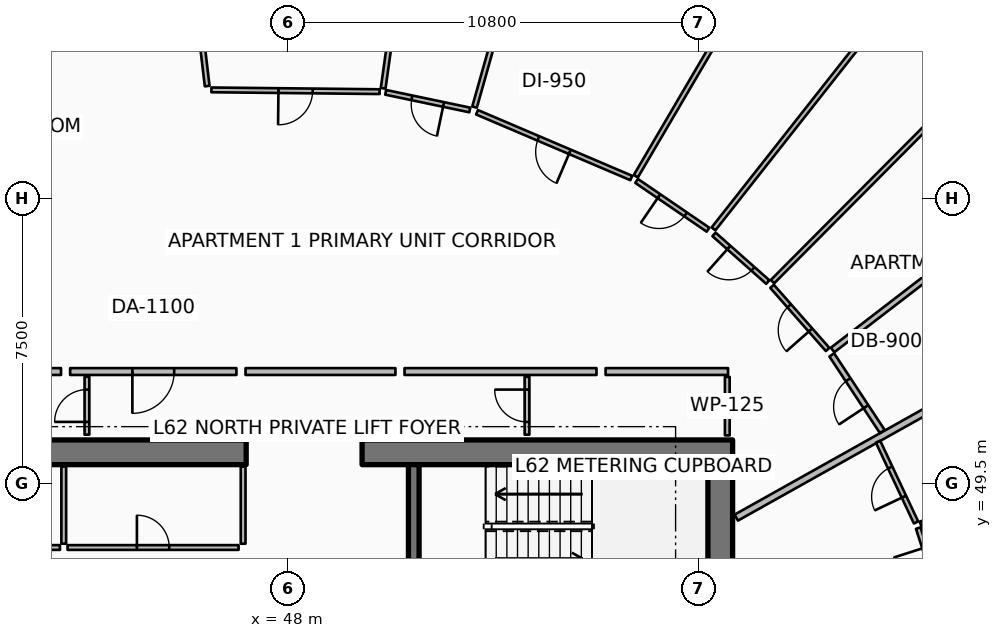
"""IFC4 building model, lengths in metres.
Left out: names, types, materials, properties, quantities, classifications, styles, units other than length and angle.
Written with IfcOpenShell. Run it as: python <this file> out.ifc"""

import sys

from ifc_helpers import new_model, si_unit, direction, frame, frame_2d, origin, place, context, subcontext, project, spatial, rectangle, extrude, element, fill, save


model = new_model("IFC4")
c1 = context("Model", 3, precision=1e-05, world=origin(), true_north=direction((0.0, 1.0)))
c2 = subcontext(c1, "Body", "Model", "MODEL_VIEW")
j1 = project(units=[si_unit("LENGTHUNIT", "METRE"), si_unit("PLANEANGLEUNIT", "RADIAN")], contexts=[c1])
p1 = place(None, origin())
s1 = spatial("IfcSite", under=j1, at=p1, CompositionType="ELEMENT")
p2 = place(p1, origin())
s2 = spatial("IfcBuilding", under=s1, at=p2, CompositionType="ELEMENT")
p3 = place(p2, frame((0.0, 0.0, 248.25)))
s3 = spatial("IfcBuildingStorey", under=s2, at=p3, CompositionType="ELEMENT", Elevation=248.25)
for number, where, z_axis, x_axis in (
    (1, (37.15, 50.325, 0.0), (0.0, 0.0, 1.0), (1.0, 0.0, 0.0)),
    (2, (49.95, 50.325, 0.0), (0.0, 0.0, 1.0), (1.0, 0.0, 0.0)),
):
    element("IfcWall", number, at=place(p3, frame(where, z_axis=z_axis, x_axis=x_axis)), inside=s3, PredefinedType="SHEAR", context=c2, shape_type="SweptSolid", body=[
        extrude(rectangle(XDim=9.75, YDim=0.65, at=frame_2d((4.875, 0.0))), origin(), (0.0, 0.0, 1.0), 3.85),
    ])
p4 = place(p3, frame((59.375, 34.0, 0.0), z_axis=(0.0, 0.0, 1.0), x_axis=(0.0, 1.0, 0.0)))
e3 = element("IfcWall", 3, at=p4, inside=s3, PredefinedType="SHEAR", context=c2, shape_type="SweptSolid", body=[
    extrude(rectangle(XDim=16.0, YDim=0.65, at=frame_2d((8.0, 0.0))), origin(), (0.0, 0.0, 1.0), 3.85),
])
p5 = place(p3, frame((51.31, 46.5, 0.0), z_axis=(0.0, 0.0, 1.0), x_axis=(0.0, 1.0, 0.0)))
e4 = element("IfcWall", 4, at=p5, inside=s3, PredefinedType="SHEAR", context=c2, shape_type="SweptSolid", body=[
    extrude(rectangle(XDim=3.5, YDim=0.28, at=frame_2d((1.75, 0.0))), origin(), (0.0, 0.0, 1.0), 3.85),
])
for number, where, z_axis, x_axis in (
    (5, (46.82, 47.92, 0.0), (0.0, 0.0, 1.0), (0.0, 1.0, 0.0)),
    (6, (42.1, 47.92, 0.0), (0.0, 0.0, 1.0), (0.0, 1.0, 0.0)),
):
    element("IfcWall", number, at=place(p3, frame(where, z_axis=z_axis, x_axis=x_axis)), inside=s3, PredefinedType="PARTITIONING", context=c2, shape_type="SweptSolid", body=[
        extrude(rectangle(XDim=2.03, YDim=0.125, at=frame_2d((1.015, 0.0))), origin(), (0.0, 0.0, 1.0), 3.03),
    ])
p6 = place(p3, frame((37.92, 47.82, 0.0), z_axis=(0.0, 0.0, 1.0), x_axis=(1.0, 0.0, 0.0)))
e7 = element("IfcWall", 7, at=p6, inside=s3, PredefinedType="PARTITIONING", context=c2, shape_type="SweptSolid", body=[
    extrude(rectangle(XDim=4.08, YDim=0.125, at=frame_2d((2.04, 0.0))), origin(), (0.0, 0.0, 1.0), 3.03),
])
p7 = place(p6, frame((1.615, 0.0, 0.0)))
e8 = element("IfcOpeningElement", 8, at=p7, cuts=e7, PredefinedType="OPENING", context=c2, shape_type="SweptSolid", body=[
    extrude(rectangle(XDim=0.85, YDim=2.06, at=frame_2d((0.425, 1.03))), frame((0.0, 0.073, 0.0), z_axis=(0.0, -1.0, 0.0), x_axis=(1.0, 0.0, 0.0)), (0.0, 0.0, 1.0), 0.145),
])
p8 = place(p3, frame((42.2, 47.82, 0.0), z_axis=(0.0, 0.0, 1.0), x_axis=(1.0, 0.0, 0.0)))
e9 = element("IfcWall", 9, at=p8, inside=s3, PredefinedType="PARTITIONING", context=c2, shape_type="SweptSolid", body=[
    extrude(rectangle(XDim=4.5, YDim=0.125, at=frame_2d((2.25, 0.0))), origin(), (0.0, 0.0, 1.0), 3.03),
])
p9 = place(p8, frame((1.825, 0.0, 0.0)))
e10 = element("IfcOpeningElement", 10, at=p9, cuts=e9, PredefinedType="OPENING", context=c2, shape_type="SweptSolid", body=[
    extrude(rectangle(XDim=0.85, YDim=2.06, at=frame_2d((0.425, 1.03))), frame((0.0, 0.073, 0.0), z_axis=(0.0, -1.0, 0.0), x_axis=(1.0, 0.0, 0.0)), (0.0, 0.0, 1.0), 0.145),
])
p10 = place(p3, frame((59.56, 50.77, 0.0), z_axis=(0.0, 0.0, 1.0), x_axis=(0.0, 1.0, 0.0)))
e11 = element("IfcWall", 11, at=p10, inside=s3, PredefinedType="PARTITIONING", context=c2, shape_type="SweptSolid", body=[
    extrude(rectangle(XDim=1.54, YDim=0.125, at=frame_2d((0.77, 0.0))), origin(), (0.0, 0.0, 1.0), 3.03),
])
p11 = place(p3, frame((42.71, 50.79, 0.0), z_axis=(0.0, 0.0, 1.0), x_axis=(0.0, 1.0, 0.0)))
e12 = element("IfcWall", 12, at=p11, inside=s3, PredefinedType="PARTITIONING", context=c2, shape_type="SweptSolid", body=[
    extrude(rectangle(XDim=1.52, YDim=0.125, at=frame_2d((0.76, 0.0))), origin(), (0.0, 0.0, 1.0), 2.957),
])
p12 = place(p11, frame((0.335, 0.0, 0.0)))
e13 = element("IfcOpeningElement", 13, at=p12, cuts=e12, PredefinedType="OPENING", context=c2, shape_type="SweptSolid", body=[
    extrude(rectangle(XDim=0.85, YDim=2.06, at=frame_2d((0.425, 1.03))), frame((0.0, 0.073, 0.0), z_axis=(0.0, -1.0, 0.0), x_axis=(1.0, 0.0, 0.0)), (0.0, 0.0, 1.0), 0.145),
])
p13 = place(p3, frame((54.29, 50.79, 0.0), z_axis=(0.0, 0.0, 1.0), x_axis=(0.0, 1.0, 0.0)))
e14 = element("IfcWall", 14, at=p13, inside=s3, PredefinedType="PARTITIONING", context=c2, shape_type="SweptSolid", body=[
    extrude(rectangle(XDim=1.52, YDim=0.125, at=frame_2d((0.76, 0.0))), origin(), (0.0, 0.0, 1.0), 3.03),
])
p14 = place(p13, frame((0.335, 0.0, 0.0)))
e15 = element("IfcOpeningElement", 15, at=p14, cuts=e14, PredefinedType="OPENING", context=c2, shape_type="SweptSolid", body=[
    extrude(rectangle(XDim=0.85, YDim=2.06, at=frame_2d((0.425, 1.03))), frame((0.0, 0.073, 0.0), z_axis=(0.0, -1.0, 0.0), x_axis=(1.0, 0.0, 0.0)), (0.0, 0.0, 1.0), 0.145),
])
p15 = place(p3, frame((59.796, 48.606, 0.0), z_axis=(0.0, 0.0, 1.0), x_axis=(0.872493213488, 0.488626229767, 0.0)))
e16 = element("IfcWall", 16, at=p15, inside=s3, PredefinedType="PARTITIONING", context=c2, shape_type="SweptSolid", body=[
    extrude(rectangle(XDim=16.91, YDim=0.18, at=frame_2d((8.455, 0.0))), origin(), (0.0, 0.0, 1.0), 2.957),
])
p16 = place(p3, frame((46.643, 52.45, 0.0), z_axis=(0.0, 0.0, 1.0), x_axis=(-1.0, 0.0, 0.0)))
e17 = element("IfcWall", 17, at=p16, inside=s3, PredefinedType="PARTITIONING", context=c2, shape_type="SweptSolid", body=[
    extrude(rectangle(XDim=4.376, YDim=0.18, at=frame_2d((2.188, 0.0))), origin(), (0.0, 0.0, 1.0), 2.957),
])
p17 = place(p16, frame((1.638, 0.0, 0.0)))
e18 = element("IfcOpeningElement", 18, at=p17, cuts=e17, PredefinedType="OPENING", context=c2, shape_type="SweptSolid", body=[
    extrude(rectangle(XDim=1.1, YDim=2.1, at=frame_2d((0.55, 1.05))), frame((0.0, 0.1, 0.0), z_axis=(0.0, -1.0, 0.0), x_axis=(1.0, 0.0, 0.0)), (0.0, 0.0, 1.0), 0.2),
])
p18 = place(p3, frame((59.58, 52.45, 0.0), z_axis=(0.0, 0.0, 1.0), x_axis=(-1.0, 0.0, 0.0)))
e19 = element("IfcWall", 19, at=p18, inside=s3, PredefinedType="PARTITIONING", context=c2, shape_type="SweptSolid", body=[
    extrude(rectangle(XDim=3.222, YDim=0.18, at=frame_2d((1.611, 0.0))), origin(), (0.0, 0.0, 1.0), 2.957),
])
p19 = place(p3, frame((63.639, 50.872, 0.0), z_axis=(0.0, 0.0, 1.0), x_axis=(-0.550539267926, 0.834809268319, 0.0)))
e20 = element("IfcWall", 20, at=p19, inside=s3, PredefinedType="PARTITIONING", context=c2, shape_type="SweptSolid", body=[
    extrude(rectangle(XDim=2.414, YDim=0.15, at=frame_2d((1.207, 0.0))), origin(), (0.0, 0.0, 1.0), 2.957),
])
p20 = place(p19, frame((0.782, 0.0, 0.0)))
e21 = element("IfcOpeningElement", 21, at=p20, cuts=e20, PredefinedType="OPENING", context=c2, shape_type="SweptSolid", body=[
    extrude(rectangle(XDim=0.85, YDim=2.06, at=frame_2d((0.425, 1.03))), frame((0.0, 0.085, 0.0), z_axis=(0.0, -1.0, 0.0), x_axis=(1.0, 0.0, 0.0)), (0.0, 0.0, 1.0), 0.17),
])
p21 = place(p3, frame((62.331, 53.018, 0.0), z_axis=(0.0, 0.0, 1.0), x_axis=(0.792803030826, 0.609477935871, 0.0)))
e22 = element("IfcWall", 22, at=p21, inside=s3, PredefinedType="PARTITIONING", context=c2, shape_type="SweptSolid", body=[
    extrude(rectangle(XDim=4.46, YDim=0.15, at=frame_2d((2.23, 0.0))), origin(), (0.0, 0.0, 1.0), 3.03),
])
p22 = place(p3, frame((60.749, 54.815, 0.0), z_axis=(0.0, 0.0, 1.0), x_axis=(0.705267705861, 0.708941085753, 0.0)))
e23 = element("IfcWall", 23, at=p22, inside=s3, PredefinedType="PARTITIONING", context=c2, shape_type="SweptSolid", body=[
    extrude(rectangle(XDim=11.498, YDim=0.125, at=frame_2d((5.749, 0.0))), origin(), (0.0, 0.0, 1.0), 3.03),
])
p23 = place(p3, frame((62.2, 53.031, 0.0), z_axis=(0.0, 0.0, 1.0), x_axis=(-0.660650282497, 0.750693815238, 0.0)))
e24 = element("IfcWall", 24, at=p23, inside=s3, PredefinedType="PARTITIONING", context=c2, shape_type="SweptSolid", body=[
    extrude(rectangle(XDim=2.212, YDim=0.125, at=frame_2d((1.106, 0.0))), origin(), (0.0, 0.0, 1.0), 3.03),
])
p24 = place(p23, frame((0.681, 0.0, 0.0)))
e25 = element("IfcOpeningElement", 25, at=p24, cuts=e24, PredefinedType="OPENING", context=c2, shape_type="SweptSolid", body=[
    extrude(rectangle(XDim=0.85, YDim=2.06, at=frame_2d((0.425, 1.03))), frame((0.0, 0.073, 0.0), z_axis=(0.0, -1.0, 0.0), x_axis=(1.0, 0.0, 0.0)), (0.0, 0.0, 1.0), 0.145),
])
p25 = place(p3, frame((60.626, 54.805, 0.0), z_axis=(0.0, 0.0, 1.0), x_axis=(-0.748419746602, 0.663225363581, 0.0)))
e26 = element("IfcWall", 26, at=p25, inside=s3, PredefinedType="PARTITIONING", context=c2, shape_type="SweptSolid", body=[
    extrude(rectangle(XDim=1.891, YDim=0.125, at=frame_2d((0.946, 0.0))), origin(), (0.0, 0.0, 1.0), 2.957),
])
p26 = place(p25, frame((0.521, 0.0, 0.0)))
e27 = element("IfcOpeningElement", 27, at=p26, cuts=e26, PredefinedType="OPENING", context=c2, shape_type="SweptSolid", body=[
    extrude(rectangle(XDim=0.85, YDim=2.06, at=frame_2d((0.425, 1.03))), frame((0.0, 0.073, 0.0), z_axis=(0.0, -1.0, 0.0), x_axis=(1.0, 0.0, 0.0)), (0.0, 0.0, 1.0), 0.145),
])
p27 = place(p3, frame((56.118, 52.45, 0.0), z_axis=(0.0, 0.0, 1.0), x_axis=(-1.0, 0.0, 0.0)))
e28 = element("IfcWall", 28, at=p27, inside=s3, PredefinedType="PARTITIONING", context=c2, shape_type="SweptSolid", body=[
    extrude(rectangle(XDim=5.051, YDim=0.18, at=frame_2d((2.525, 0.0))), origin(), (0.0, 0.0, 1.0), 2.957),
])
p28 = place(p3, frame((59.198, 56.204, 0.0), z_axis=(0.0, 0.0, 1.0), x_axis=(0.619101452742, 0.785311015593, 0.0)))
e29 = element("IfcWall", 29, at=p28, inside=s3, PredefinedType="PARTITIONING", context=c2, shape_type="SweptSolid", body=[
    extrude(rectangle(XDim=11.509, YDim=0.125, at=frame_2d((5.754, 0.0))), origin(), (0.0, 0.0, 1.0), 2.957),
])
p29 = place(p3, frame((57.153, 57.588, 0.0), z_axis=(0.0, 0.0, 1.0), x_axis=(0.506323477253, 0.862343630105, 0.0)))
e30 = element("IfcWall", 30, at=p29, inside=s3, PredefinedType="PARTITIONING", context=c2, shape_type="SweptSolid", body=[
    extrude(rectangle(XDim=9.988, YDim=0.125, at=frame_2d((4.994, 0.0))), origin(), (0.0, 0.0, 1.0), 3.03),
])
p30 = place(p3, frame((59.053, 56.182, 0.0), z_axis=(0.0, 0.0, 1.0), x_axis=(-0.825709590898, 0.56409544538, 0.0)))
e31 = element("IfcWall", 31, at=p30, inside=s3, PredefinedType="PARTITIONING", context=c2, shape_type="SweptSolid", body=[
    extrude(rectangle(XDim=2.276, YDim=0.125, at=frame_2d((1.138, 0.0))), origin(), (0.0, 0.0, 1.0), 2.957),
])
p31 = place(p30, frame((0.713, 0.0, 0.0)))
e32 = element("IfcOpeningElement", 32, at=p31, cuts=e31, PredefinedType="OPENING", context=c2, shape_type="SweptSolid", body=[
    extrude(rectangle(XDim=0.85, YDim=2.06, at=frame_2d((0.425, 1.03))), frame((0.0, 0.073, 0.0), z_axis=(0.0, -1.0, 0.0), x_axis=(1.0, 0.0, 0.0)), (0.0, 0.0, 1.0), 0.145),
])
p32 = place(p3, frame((57.034, 57.542, 0.0), z_axis=(0.0, 0.0, 1.0), x_axis=(-0.919921628857, 0.392102278445, 0.0)))
e33 = element("IfcWall", 33, at=p32, inside=s3, PredefinedType="PARTITIONING", context=c2, shape_type="SweptSolid", body=[
    extrude(rectangle(XDim=4.413, YDim=0.125, at=frame_2d((2.206, 0.0))), origin(), (0.0, 0.0, 1.0), 2.957),
])
p33 = place(p32, frame((1.756, 0.0, 0.0)))
e34 = element("IfcOpeningElement", 34, at=p33, cuts=e33, PredefinedType="OPENING", context=c2, shape_type="SweptSolid", body=[
    extrude(rectangle(XDim=0.9, YDim=2.08, at=frame_2d((0.45, 1.04))), frame((0.0, 0.073, 0.0), z_axis=(0.0, -1.0, 0.0), x_axis=(1.0, 0.0, 0.0)), (0.0, 0.0, 1.0), 0.145),
])
p34 = place(p3, frame((50.827, 52.45, 0.0), z_axis=(0.0, 0.0, 1.0), x_axis=(-1.0, 0.0, 0.0)))
e35 = element("IfcWall", 35, at=p34, inside=s3, PredefinedType="PARTITIONING", context=c2, shape_type="SweptSolid", body=[
    extrude(rectangle(XDim=3.944, YDim=0.18, at=frame_2d((1.972, 0.0))), origin(), (0.0, 0.0, 1.0), 2.957),
])
p35 = place(p3, frame((52.909, 59.408, 0.0), z_axis=(0.0, 0.0, 1.0), x_axis=(0.271454299549, 0.962451330331, 0.0)))
e36 = element("IfcWall", 36, at=p35, inside=s3, PredefinedType="PARTITIONING", context=c2, shape_type="SweptSolid", body=[
    extrude(rectangle(XDim=8.897, YDim=0.125, at=frame_2d((4.449, 0.0))), origin(), (0.0, 0.0, 1.0), 2.957),
])
p36 = place(p3, frame((45.874, 59.962, 0.0), z_axis=(0.0, 0.0, 1.0), x_axis=(-0.117533659592, 0.993068899353, 0.0)))
e37 = element("IfcWall", 37, at=p36, inside=s3, PredefinedType="PARTITIONING", context=c2, shape_type="SweptSolid", body=[
    extrude(rectangle(XDim=6.608, YDim=0.125, at=frame_2d((3.304, 0.0))), origin(), (0.0, 0.0, 1.0), 2.957),
])
p37 = place(p3, frame((50.505, 59.903, 0.0), z_axis=(0.0, 0.0, 1.0), x_axis=(0.138550424847, 0.990355380545, 0.0)))
e38 = element("IfcWall", 38, at=p37, inside=s3, PredefinedType="PARTITIONING", context=c2, shape_type="SweptSolid", body=[
    extrude(rectangle(XDim=7.669, YDim=0.125, at=frame_2d((3.834, 0.0))), origin(), (0.0, 0.0, 1.0), 3.03),
])
p38 = place(p3, frame((52.784, 59.332, 0.0), z_axis=(0.0, 0.0, 1.0), x_axis=(-0.978655016217, 0.205509997891, 0.0)))
e39 = element("IfcWall", 39, at=p38, inside=s3, PredefinedType="PARTITIONING", context=c2, shape_type="SweptSolid", body=[
    extrude(rectangle(XDim=2.262, YDim=0.125, at=frame_2d((1.131, 0.0))), origin(), (0.0, 0.0, 1.0), 2.957),
])
p39 = place(p38, frame((0.706, 0.0, 0.0)))
e40 = element("IfcOpeningElement", 40, at=p39, cuts=e39, PredefinedType="OPENING", context=c2, shape_type="SweptSolid", body=[
    extrude(rectangle(XDim=0.85, YDim=2.06, at=frame_2d((0.425, 1.03))), frame((0.0, 0.073, 0.0), z_axis=(0.0, -1.0, 0.0), x_axis=(1.0, 0.0, 0.0)), (0.0, 0.0, 1.0), 0.145),
])
p40 = place(p3, frame((50.412, 59.814, 0.0), z_axis=(0.0, 0.0, 1.0), x_axis=(-0.999943934923, 0.01058900422, 0.0)))
e41 = element("IfcWall", 41, at=p40, inside=s3, PredefinedType="PARTITIONING", context=c2, shape_type="SweptSolid", body=[
    extrude(rectangle(XDim=4.427, YDim=0.125, at=frame_2d((2.213, 0.0))), origin(), (0.0, 0.0, 1.0), 3.03),
])
p41 = place(p40, frame((1.763, 0.0, 0.0)))
e42 = element("IfcOpeningElement", 42, at=p41, cuts=e41, PredefinedType="OPENING", context=c2, shape_type="SweptSolid", body=[
    extrude(rectangle(XDim=0.9, YDim=2.08, at=frame_2d((0.45, 1.04))), frame((0.0, 0.073, 0.0), z_axis=(0.0, -1.0, 0.0), x_axis=(1.0, 0.0, 0.0)), (0.0, 0.0, 1.0), 0.145),
])
p42 = place(p3, frame((42.028, 52.45, 0.0), z_axis=(0.0, 0.0, 1.0), x_axis=(-1.0, 0.0, 0.0)))
e43 = element("IfcWall", 43, at=p42, inside=s3, PredefinedType="PARTITIONING", context=c2, shape_type="SweptSolid", body=[
    extrude(rectangle(XDim=4.758, YDim=0.18, at=frame_2d((2.379, 0.0))), origin(), (0.0, 0.0, 1.0), 2.957),
])
p43 = place(p3, frame((64.645, 48.439, 0.0), z_axis=(0.0, 0.0, 1.0), x_axis=(0.93263897003, 0.360810963778, 0.0)))
e44 = element("IfcWall", 44, at=p43, inside=s3, PredefinedType="PARTITIONING", context=c2, shape_type="SweptSolid", body=[
    extrude(rectangle(XDim=12.043, YDim=0.125, at=frame_2d((6.021, 0.0))), origin(), (0.0, 0.0, 1.0), 3.03),
])
p44 = place(p3, frame((65.175, 46.492, 0.0), z_axis=(0.0, 0.0, 1.0), x_axis=(-0.305358332679, 0.952237516938, 0.0)))
e45 = element("IfcWall", 45, at=p44, inside=s3, PredefinedType="PARTITIONING", context=c2, shape_type="SweptSolid", body=[
    extrude(rectangle(XDim=1.931, YDim=0.125, at=frame_2d((0.965, 0.0))), origin(), (0.0, 0.0, 1.0), 3.03),
])
p45 = place(p44, frame((0.54, 0.0, 0.0)))
e46 = element("IfcOpeningElement", 46, at=p45, cuts=e45, PredefinedType="OPENING", context=c2, shape_type="SweptSolid", body=[
    extrude(rectangle(XDim=0.85, YDim=2.06, at=frame_2d((0.425, 1.03))), frame((0.0, 0.073, 0.0), z_axis=(0.0, -1.0, 0.0), x_axis=(1.0, 0.0, 0.0)), (0.0, 0.0, 1.0), 0.145),
])
p46 = place(p3, frame((64.527, 48.479, 0.0), z_axis=(0.0, 0.0, 1.0), x_axis=(-0.425751972865, 0.904839907167, 0.0)))
e47 = element("IfcWall", 47, at=p46, inside=s3, PredefinedType="PARTITIONING", context=c2, shape_type="SweptSolid", body=[
    extrude(rectangle(XDim=2.348, YDim=0.125, at=frame_2d((1.174, 0.0))), origin(), (0.0, 0.0, 1.0), 2.957),
])
p47 = place(p46, frame((0.749, 0.0, 0.0)))
e48 = element("IfcOpeningElement", 48, at=p47, cuts=e47, PredefinedType="OPENING", context=c2, shape_type="SweptSolid", body=[
    extrude(rectangle(XDim=0.85, YDim=2.06, at=frame_2d((0.425, 1.03))), frame((0.0, 0.073, 0.0), z_axis=(0.0, -1.0, 0.0), x_axis=(1.0, 0.0, 0.0)), (0.0, 0.0, 1.0), 0.145),
])
p48 = place(p9, origin())
e49 = element("IfcDoor", 49, at=p48, inside=s3, OperationType="SINGLE_SWING_LEFT", PredefinedType="DOOR", context=c2, shape_type="SweptSolid", body=[
    extrude(rectangle(XDim=0.85, YDim=2.06, at=frame_2d((0.425, 1.03))), frame((0.0, 0.025, 0.0), z_axis=(0.0, -1.0, 0.0), x_axis=(1.0, 0.0, 0.0)), (0.0, 0.0, 1.0), 0.05),
])
fill(e10, e49)
p49 = place(p12, origin())
e50 = element("IfcDoor", 50, at=p49, inside=s3, OperationType="SINGLE_SWING_LEFT", PredefinedType="DOOR", context=c2, shape_type="SweptSolid", body=[
    extrude(rectangle(XDim=0.85, YDim=2.06, at=frame_2d((0.425, 1.03))), frame((0.0, 0.025, 0.0), z_axis=(0.0, -1.0, 0.0), x_axis=(1.0, 0.0, 0.0)), (0.0, 0.0, 1.0), 0.05),
])
fill(e13, e50)
p50 = place(p14, origin())
e51 = element("IfcDoor", 51, at=p50, inside=s3, OperationType="SINGLE_SWING_RIGHT", PredefinedType="DOOR", context=c2, shape_type="SweptSolid", body=[
    extrude(rectangle(XDim=0.85, YDim=2.06, at=frame_2d((0.425, 1.03))), frame((0.0, 0.025, 0.0), z_axis=(0.0, -1.0, 0.0), x_axis=(1.0, 0.0, 0.0)), (0.0, 0.0, 1.0), 0.05),
])
fill(e15, e51)
p51 = place(p17, origin())
e52 = element("IfcDoor", 52, at=p51, inside=s3, OperationType="SINGLE_SWING_RIGHT", PredefinedType="DOOR", context=c2, shape_type="SweptSolid", body=[
    extrude(rectangle(XDim=1.1, YDim=2.1, at=frame_2d((0.55, 1.05))), frame((0.0, 0.025, 0.0), z_axis=(0.0, -1.0, 0.0), x_axis=(1.0, 0.0, 0.0)), (0.0, 0.0, 1.0), 0.05),
])
fill(e18, e52)
p52 = place(p20, origin())
e53 = element("IfcDoor", 53, at=p52, inside=s3, OperationType="SINGLE_SWING_LEFT", PredefinedType="DOOR", context=c2, shape_type="SweptSolid", body=[
    extrude(rectangle(XDim=0.85, YDim=2.06, at=frame_2d((0.425, 1.03))), frame((0.0, 0.025, 0.0), z_axis=(0.0, -1.0, 0.0), x_axis=(1.0, 0.0, 0.0)), (0.0, 0.0, 1.0), 0.05),
])
fill(e21, e53)
p53 = place(p24, origin())
e54 = element("IfcDoor", 54, at=p53, inside=s3, OperationType="SINGLE_SWING_LEFT", PredefinedType="DOOR", context=c2, shape_type="SweptSolid", body=[
    extrude(rectangle(XDim=0.85, YDim=2.06, at=frame_2d((0.425, 1.03))), frame((0.0, 0.025, 0.0), z_axis=(0.0, -1.0, 0.0), x_axis=(1.0, 0.0, 0.0)), (0.0, 0.0, 1.0), 0.05),
])
fill(e25, e54)
p54 = place(p26, origin())
e55 = element("IfcDoor", 55, at=p54, inside=s3, OperationType="SINGLE_SWING_RIGHT", PredefinedType="DOOR", context=c2, shape_type="SweptSolid", body=[
    extrude(rectangle(XDim=0.85, YDim=2.06, at=frame_2d((0.425, 1.03))), frame((0.0, 0.025, 0.0), z_axis=(0.0, -1.0, 0.0), x_axis=(1.0, 0.0, 0.0)), (0.0, 0.0, 1.0), 0.05),
])
fill(e27, e55)
p55 = place(p31, origin())
e56 = element("IfcDoor", 56, at=p55, inside=s3, OperationType="SINGLE_SWING_RIGHT", PredefinedType="DOOR", context=c2, shape_type="SweptSolid", body=[
    extrude(rectangle(XDim=0.85, YDim=2.06, at=frame_2d((0.425, 1.03))), frame((0.0, 0.025, 0.0), z_axis=(0.0, -1.0, 0.0), x_axis=(1.0, 0.0, 0.0)), (0.0, 0.0, 1.0), 0.05),
])
fill(e32, e56)
p56 = place(p33, origin())
e57 = element("IfcDoor", 57, at=p56, inside=s3, OperationType="SINGLE_SWING_LEFT", PredefinedType="DOOR", context=c2, shape_type="SweptSolid", body=[
    extrude(rectangle(XDim=0.9, YDim=2.08, at=frame_2d((0.45, 1.04))), frame((0.0, 0.025, 0.0), z_axis=(0.0, -1.0, 0.0), x_axis=(1.0, 0.0, 0.0)), (0.0, 0.0, 1.0), 0.05),
])
fill(e34, e57)
p57 = place(p39, origin())
e58 = element("IfcDoor", 58, at=p57, inside=s3, OperationType="SINGLE_SWING_LEFT", PredefinedType="DOOR", context=c2, shape_type="SweptSolid", body=[
    extrude(rectangle(XDim=0.85, YDim=2.06, at=frame_2d((0.425, 1.03))), frame((0.0, 0.025, 0.0), z_axis=(0.0, -1.0, 0.0), x_axis=(1.0, 0.0, 0.0)), (0.0, 0.0, 1.0), 0.05),
])
fill(e40, e58)
p58 = place(p41, origin())
e59 = element("IfcDoor", 59, at=p58, inside=s3, OperationType="SINGLE_SWING_RIGHT", PredefinedType="DOOR", context=c2, shape_type="SweptSolid", body=[
    extrude(rectangle(XDim=0.9, YDim=2.08, at=frame_2d((0.45, 1.04))), frame((0.0, 0.025, 0.0), z_axis=(0.0, -1.0, 0.0), x_axis=(1.0, 0.0, 0.0)), (0.0, 0.0, 1.0), 0.05),
])
fill(e42, e59)
p59 = place(p47, origin())
e60 = element("IfcDoor", 60, at=p59, inside=s3, OperationType="SINGLE_SWING_LEFT", PredefinedType="DOOR", context=c2, shape_type="SweptSolid", body=[
    extrude(rectangle(XDim=0.85, YDim=2.06, at=frame_2d((0.425, 1.03))), frame((0.0, 0.025, 0.0), z_axis=(0.0, -1.0, 0.0), x_axis=(1.0, 0.0, 0.0)), (0.0, 0.0, 1.0), 0.05),
])
fill(e48, e60)
save(model, sys.argv[1])
